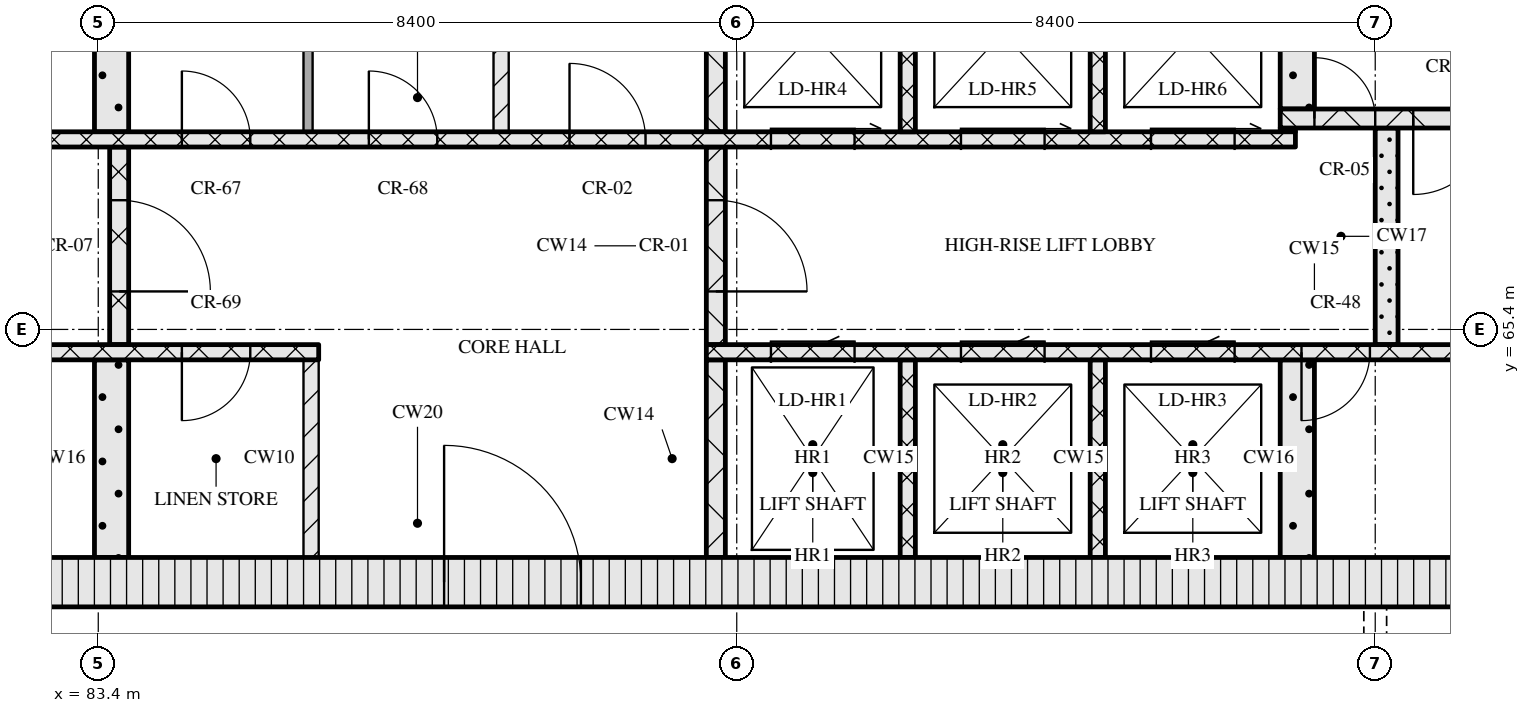
"""IFC4 building model, lengths in metres.
Left out: names, types, materials, properties, quantities, classifications, styles, units other than length and angle.
Written with IfcOpenShell. Run it as: python <this file> out.ifc"""

import sys

from ifc_helpers import new_model, si_unit, direction, frame, frame_2d, origin, place, context, subcontext, project, spatial, rectangle, extrude, element, fill, save


model = new_model("IFC4")
c1 = context("Model", 3, precision=1e-05, world=origin(), true_north=direction((0.0, 1.0)))
c2 = subcontext(c1, "Body", "Model", "MODEL_VIEW")
j1 = project(units=[si_unit("LENGTHUNIT", "METRE"), si_unit("PLANEANGLEUNIT", "RADIAN")], contexts=[c1])
p1 = place(None, origin())
s1 = spatial("IfcSite", under=j1, at=p1, CompositionType="ELEMENT")
p2 = place(p1, origin())
s2 = spatial("IfcBuilding", under=s1, at=p2, CompositionType="ELEMENT")
p3 = place(p2, frame((0.0, 0.0, 241.5)))
s3 = spatial("IfcBuildingStorey", under=s2, at=p3, CompositionType="ELEMENT", Elevation=241.5)
p4 = place(p3, frame((67.15, 62.075, 0.0), z_axis=(0.0, 0.0, 1.0), x_axis=(1.0, 0.0, 0.0)))
e1 = element("IfcWall", 1, at=p4, inside=s3, PredefinedType="SOLIDWALL", context=c2, shape_type="SweptSolid", body=[
    extrude(rectangle(XDim=40.9, YDim=0.65, at=frame_2d((20.45, 0.0))), origin(), (0.0, 0.0, 1.0), 3.32),
])
p5 = place(p4, frame((20.8, 0.0, 0.0)))
e2 = element("IfcOpeningElement", 2, at=p5, cuts=e1, PredefinedType="OPENING", context=c2, shape_type="SweptSolid", body=[
    extrude(rectangle(XDim=1.8, YDim=2.1, at=frame_2d((0.9, 1.05))), frame((0.0, 0.335, 0.0), z_axis=(0.0, -1.0, 0.0), x_axis=(1.0, 0.0, 0.0)), (0.0, 0.0, 1.0), 0.67),
])
p6 = place(p3, frame((83.575, 62.4, 0.0), z_axis=(0.0, 0.0, 1.0), x_axis=(0.0, 1.0, 0.0)))
e3 = element("IfcWall", 3, at=p6, inside=s3, PredefinedType="SOLIDWALL", context=c2, shape_type="SweptSolid", body=[
    extrude(rectangle(XDim=2.6, YDim=0.45, at=frame_2d((1.3, 0.0))), origin(), (0.0, 0.0, 1.0), 3.32),
])
p7 = place(p3, frame((86.2, 62.4, 0.0), z_axis=(0.0, 0.0, 1.0), x_axis=(0.0, 1.0, 0.0)))
e4 = element("IfcWall", 4, at=p7, inside=s3, PredefinedType="PARTITIONING", context=c2, shape_type="SweptSolid", body=[
    extrude(rectangle(XDim=2.6, YDim=0.2, at=frame_2d((1.3, 0.0))), origin(), (0.0, 0.0, 1.0), 3.32),
])
p8 = place(p3, frame((91.525, 62.4, 0.0), z_axis=(0.0, 0.0, 1.0), x_axis=(0.0, 1.0, 0.0)))
e5 = element("IfcWall", 5, at=p8, inside=s3, PredefinedType="SOLIDWALL", context=c2, shape_type="SweptSolid", body=[
    extrude(rectangle(XDim=2.6, YDim=0.25, at=frame_2d((1.3, 0.0))), origin(), (0.0, 0.0, 1.0), 3.32),
])
for number, where, z_axis, x_axis in (
    (6, (94.05, 62.4, 0.0), (0.0, 0.0, 1.0), (0.0, 1.0, 0.0)),
    (7, (96.55, 62.4, 0.0), (0.0, 0.0, 1.0), (0.0, 1.0, 0.0)),
):
    element("IfcWall", number, at=place(p3, frame(where, z_axis=z_axis, x_axis=x_axis)), inside=s3, PredefinedType="SOLIDWALL", context=c2, shape_type="SweptSolid", body=[
        extrude(rectangle(XDim=2.6, YDim=0.2, at=frame_2d((1.3, 0.0))), origin(), (0.0, 0.0, 1.0), 3.32),
    ])
p9 = place(p3, frame((99.175, 62.4, 0.0), z_axis=(0.0, 0.0, 1.0), x_axis=(0.0, 1.0, 0.0)))
e8 = element("IfcWall", 8, at=p9, inside=s3, PredefinedType="SOLIDWALL", context=c2, shape_type="SweptSolid", body=[
    extrude(rectangle(XDim=2.6, YDim=0.45, at=frame_2d((1.3, 0.0))), origin(), (0.0, 0.0, 1.0), 3.32),
])
p10 = place(p3, frame((67.8, 65.1, 0.0), z_axis=(0.0, 0.0, 1.0), x_axis=(1.0, 0.0, 0.0)))
e9 = element("IfcWall", 9, at=p10, inside=s3, PredefinedType="SOLIDWALL", context=c2, shape_type="SweptSolid", body=[
    extrude(rectangle(XDim=18.5, YDim=0.2, at=frame_2d((9.25, 0.0))), origin(), (0.0, 0.0, 1.0), 3.32),
])
p11 = place(p10, frame((7.27, 0.0, 0.0)))
e10 = element("IfcOpeningElement", 10, at=p11, cuts=e9, PredefinedType="OPENING", context=c2, shape_type="SweptSolid", body=[
    extrude(rectangle(XDim=0.9, YDim=2.1, at=frame_2d((0.45, 1.05))), frame((0.0, 0.11, 0.0), z_axis=(0.0, -1.0, 0.0), x_axis=(1.0, 0.0, 0.0)), (0.0, 0.0, 1.0), 0.22),
])
p12 = place(p10, frame((9.65, 0.0, 0.0)))
e11 = element("IfcOpeningElement", 11, at=p12, cuts=e9, PredefinedType="OPENING", context=c2, shape_type="SweptSolid", body=[
    extrude(rectangle(XDim=0.9, YDim=2.1, at=frame_2d((0.45, 1.05))), frame((0.0, 0.11, 0.0), z_axis=(0.0, -1.0, 0.0), x_axis=(1.0, 0.0, 0.0)), (0.0, 0.0, 1.0), 0.22),
])
p13 = place(p10, frame((13.36, 0.0, 0.0)))
e12 = element("IfcOpeningElement", 12, at=p13, cuts=e9, PredefinedType="OPENING", context=c2, shape_type="SweptSolid", body=[
    extrude(rectangle(XDim=0.9, YDim=2.1, at=frame_2d((0.45, 1.05))), frame((0.0, 0.11, 0.0), z_axis=(0.0, -1.0, 0.0), x_axis=(1.0, 0.0, 0.0)), (0.0, 0.0, 1.0), 0.22),
])
p14 = place(p10, frame((16.7, 0.0, 0.0)))
e13 = element("IfcOpeningElement", 13, at=p14, cuts=e9, PredefinedType="OPENING", context=c2, shape_type="SweptSolid", body=[
    extrude(rectangle(XDim=0.9, YDim=2.1, at=frame_2d((0.45, 1.05))), frame((0.0, 0.11, 0.0), z_axis=(0.0, -1.0, 0.0), x_axis=(1.0, 0.0, 0.0)), (0.0, 0.0, 1.0), 0.22),
])
p15 = place(p3, frame((91.4, 65.1, 0.0), z_axis=(0.0, 0.0, 1.0), x_axis=(1.0, 0.0, 0.0)))
e14 = element("IfcWall", 14, at=p15, inside=s3, PredefinedType="SOLIDWALL", context=c2, shape_type="SweptSolid", body=[
    extrude(rectangle(XDim=16.0, YDim=0.2, at=frame_2d((8.0, 0.0))), origin(), (0.0, 0.0, 1.0), 3.32),
])
p16 = place(p15, frame((0.85, 0.0, 0.0)))
e15 = element("IfcOpeningElement", 15, at=p16, cuts=e14, PredefinedType="OPENING", context=c2, shape_type="SweptSolid", body=[
    extrude(rectangle(XDim=1.1, YDim=2.1, at=frame_2d((0.55, 1.05))), frame((0.0, 0.11, 0.0), z_axis=(0.0, -1.0, 0.0), x_axis=(1.0, 0.0, 0.0)), (0.0, 0.0, 1.0), 0.22),
])
p17 = place(p15, frame((3.35, 0.0, 0.0)))
e16 = element("IfcOpeningElement", 16, at=p17, cuts=e14, PredefinedType="OPENING", context=c2, shape_type="SweptSolid", body=[
    extrude(rectangle(XDim=1.1, YDim=2.1, at=frame_2d((0.55, 1.05))), frame((0.0, 0.11, 0.0), z_axis=(0.0, -1.0, 0.0), x_axis=(1.0, 0.0, 0.0)), (0.0, 0.0, 1.0), 0.22),
])
p18 = place(p15, frame((5.85, 0.0, 0.0)))
e17 = element("IfcOpeningElement", 17, at=p18, cuts=e14, PredefinedType="OPENING", context=c2, shape_type="SweptSolid", body=[
    extrude(rectangle(XDim=1.1, YDim=2.1, at=frame_2d((0.55, 1.05))), frame((0.0, 0.11, 0.0), z_axis=(0.0, -1.0, 0.0), x_axis=(1.0, 0.0, 0.0)), (0.0, 0.0, 1.0), 0.22),
])
p19 = place(p15, frame((7.83, 0.0, 0.0)))
e18 = element("IfcOpeningElement", 18, at=p19, cuts=e14, PredefinedType="OPENING", context=c2, shape_type="SweptSolid", body=[
    extrude(rectangle(XDim=0.9, YDim=2.1, at=frame_2d((0.45, 1.05))), frame((0.0, 0.11, 0.0), z_axis=(0.0, -1.0, 0.0), x_axis=(1.0, 0.0, 0.0)), (0.0, 0.0, 1.0), 0.22),
])
p20 = place(p3, frame((83.675, 65.2, 0.0), z_axis=(0.0, 0.0, 1.0), x_axis=(0.0, 1.0, 0.0)))
e19 = element("IfcWall", 19, at=p20, inside=s3, PredefinedType="SOLIDWALL", context=c2, shape_type="SweptSolid", body=[
    extrude(rectangle(XDim=2.6, YDim=0.25, at=frame_2d((1.3, 0.0))), origin(), (0.0, 0.0, 1.0), 3.32),
])
p21 = place(p20, frame((0.7, 0.0, 0.0)))
e20 = element("IfcOpeningElement", 20, at=p21, cuts=e19, PredefinedType="OPENING", context=c2, shape_type="SweptSolid", body=[
    extrude(rectangle(XDim=1.2, YDim=2.1, at=frame_2d((0.6, 1.05))), frame((0.0, 0.135, 0.0), z_axis=(0.0, -1.0, 0.0), x_axis=(1.0, 0.0, 0.0)), (0.0, 0.0, 1.0), 0.27),
])
p22 = place(p3, frame((91.525, 65.2, 0.0), z_axis=(0.0, 0.0, 1.0), x_axis=(0.0, 1.0, 0.0)))
e21 = element("IfcWall", 21, at=p22, inside=s3, PredefinedType="SOLIDWALL", context=c2, shape_type="SweptSolid", body=[
    extrude(rectangle(XDim=2.6, YDim=0.25, at=frame_2d((1.3, 0.0))), origin(), (0.0, 0.0, 1.0), 3.32),
])
p23 = place(p22, frame((0.7, 0.0, 0.0)))
e22 = element("IfcOpeningElement", 22, at=p23, cuts=e21, PredefinedType="OPENING", context=c2, shape_type="SweptSolid", body=[
    extrude(rectangle(XDim=1.2, YDim=2.1, at=frame_2d((0.6, 1.05))), frame((0.0, 0.135, 0.0), z_axis=(0.0, -1.0, 0.0), x_axis=(1.0, 0.0, 0.0)), (0.0, 0.0, 1.0), 0.27),
])
p24 = place(p3, frame((100.35, 65.2, 0.0), z_axis=(0.0, 0.0, 1.0), x_axis=(0.0, 1.0, 0.0)))
e23 = element("IfcWall", 23, at=p24, inside=s3, PredefinedType="SOLIDWALL", context=c2, shape_type="SweptSolid", body=[
    extrude(rectangle(XDim=2.85, YDim=0.3, at=frame_2d((1.425, 0.0))), origin(), (0.0, 0.0, 1.0), 3.32),
])
p25 = place(p3, frame((76.05, 67.9, 0.0), z_axis=(0.0, 0.0, 1.0), x_axis=(1.0, 0.0, 0.0)))
e24 = element("IfcWall", 24, at=p25, inside=s3, PredefinedType="SOLIDWALL", context=c2, shape_type="SweptSolid", body=[
    extrude(rectangle(XDim=23.1, YDim=0.2, at=frame_2d((11.55, 0.0))), origin(), (0.0, 0.0, 1.0), 3.32),
])
p26 = place(p25, frame((0.75, 0.0, 0.0)))
e25 = element("IfcOpeningElement", 25, at=p26, cuts=e24, PredefinedType="OPENING", context=c2, shape_type="SweptSolid", body=[
    extrude(rectangle(XDim=0.9, YDim=2.1, at=frame_2d((0.45, 1.05))), frame((0.0, 0.11, 0.0), z_axis=(0.0, -1.0, 0.0), x_axis=(1.0, 0.0, 0.0)), (0.0, 0.0, 1.0), 0.22),
])
p27 = place(p25, frame((3.32, 0.0, 0.0)))
e26 = element("IfcOpeningElement", 26, at=p27, cuts=e24, PredefinedType="OPENING", context=c2, shape_type="SweptSolid", body=[
    extrude(rectangle(XDim=0.9, YDim=2.1, at=frame_2d((0.45, 1.05))), frame((0.0, 0.11, 0.0), z_axis=(0.0, -1.0, 0.0), x_axis=(1.0, 0.0, 0.0)), (0.0, 0.0, 1.0), 0.22),
])
p28 = place(p25, frame((5.77, 0.0, 0.0)))
e27 = element("IfcOpeningElement", 27, at=p28, cuts=e24, PredefinedType="OPENING", context=c2, shape_type="SweptSolid", body=[
    extrude(rectangle(XDim=0.9, YDim=2.1, at=frame_2d((0.45, 1.05))), frame((0.0, 0.11, 0.0), z_axis=(0.0, -1.0, 0.0), x_axis=(1.0, 0.0, 0.0)), (0.0, 0.0, 1.0), 0.22),
])
p29 = place(p25, frame((8.45, 0.0, 0.0)))
e28 = element("IfcOpeningElement", 28, at=p29, cuts=e24, PredefinedType="OPENING", context=c2, shape_type="SweptSolid", body=[
    extrude(rectangle(XDim=0.9, YDim=2.1, at=frame_2d((0.45, 1.05))), frame((0.0, 0.11, 0.0), z_axis=(0.0, -1.0, 0.0), x_axis=(1.0, 0.0, 0.0)), (0.0, 0.0, 1.0), 0.22),
])
p30 = place(p25, frame((10.91, 0.0, 0.0)))
e29 = element("IfcOpeningElement", 29, at=p30, cuts=e24, PredefinedType="OPENING", context=c2, shape_type="SweptSolid", body=[
    extrude(rectangle(XDim=0.9, YDim=2.1, at=frame_2d((0.45, 1.05))), frame((0.0, 0.11, 0.0), z_axis=(0.0, -1.0, 0.0), x_axis=(1.0, 0.0, 0.0)), (0.0, 0.0, 1.0), 0.22),
])
p31 = place(p25, frame((13.55, 0.0, 0.0)))
e30 = element("IfcOpeningElement", 30, at=p31, cuts=e24, PredefinedType="OPENING", context=c2, shape_type="SweptSolid", body=[
    extrude(rectangle(XDim=1.0, YDim=2.1, at=frame_2d((0.5, 1.05))), frame((0.0, 0.11, 0.0), z_axis=(0.0, -1.0, 0.0), x_axis=(1.0, 0.0, 0.0)), (0.0, 0.0, 1.0), 0.22),
])
p32 = place(p25, frame((16.2, 0.0, 0.0)))
e31 = element("IfcOpeningElement", 31, at=p32, cuts=e24, PredefinedType="OPENING", context=c2, shape_type="SweptSolid", body=[
    extrude(rectangle(XDim=1.1, YDim=2.1, at=frame_2d((0.55, 1.05))), frame((0.0, 0.11, 0.0), z_axis=(0.0, -1.0, 0.0), x_axis=(1.0, 0.0, 0.0)), (0.0, 0.0, 1.0), 0.22),
])
p33 = place(p25, frame((18.7, 0.0, 0.0)))
e32 = element("IfcOpeningElement", 32, at=p33, cuts=e24, PredefinedType="OPENING", context=c2, shape_type="SweptSolid", body=[
    extrude(rectangle(XDim=1.1, YDim=2.1, at=frame_2d((0.55, 1.05))), frame((0.0, 0.11, 0.0), z_axis=(0.0, -1.0, 0.0), x_axis=(1.0, 0.0, 0.0)), (0.0, 0.0, 1.0), 0.22),
])
p34 = place(p25, frame((21.2, 0.0, 0.0)))
e33 = element("IfcOpeningElement", 33, at=p34, cuts=e24, PredefinedType="OPENING", context=c2, shape_type="SweptSolid", body=[
    extrude(rectangle(XDim=1.1, YDim=2.1, at=frame_2d((0.55, 1.05))), frame((0.0, 0.11, 0.0), z_axis=(0.0, -1.0, 0.0), x_axis=(1.0, 0.0, 0.0)), (0.0, 0.0, 1.0), 0.22),
])
p35 = place(p3, frame((83.575, 68.0, 0.0), z_axis=(0.0, 0.0, 1.0), x_axis=(0.0, 1.0, 0.0)))
e34 = element("IfcWall", 34, at=p35, inside=s3, PredefinedType="SOLIDWALL", context=c2, shape_type="SweptSolid", body=[
    extrude(rectangle(XDim=2.6, YDim=0.45, at=frame_2d((1.3, 0.0))), origin(), (0.0, 0.0, 1.0), 3.32),
])
p36 = place(p3, frame((86.16, 68.0, 0.0), z_axis=(0.0, 0.0, 1.0), x_axis=(0.0, 1.0, 0.0)))
e35 = element("IfcWall", 35, at=p36, inside=s3, PredefinedType="PARTITIONING", context=c2, shape_type="SweptSolid", body=[
    extrude(rectangle(XDim=2.6, YDim=0.12, at=frame_2d((1.3, 0.0))), origin(), (0.0, 0.0, 1.0), 3.32),
])
p37 = place(p3, frame((88.7, 68.0, 0.0), z_axis=(0.0, 0.0, 1.0), x_axis=(0.0, 1.0, 0.0)))
e36 = element("IfcWall", 36, at=p37, inside=s3, PredefinedType="PARTITIONING", context=c2, shape_type="SweptSolid", body=[
    extrude(rectangle(XDim=2.6, YDim=0.2, at=frame_2d((1.3, 0.0))), origin(), (0.0, 0.0, 1.0), 3.32),
])
p38 = place(p3, frame((91.525, 68.0, 0.0), z_axis=(0.0, 0.0, 1.0), x_axis=(0.0, 1.0, 0.0)))
e37 = element("IfcWall", 37, at=p38, inside=s3, PredefinedType="SOLIDWALL", context=c2, shape_type="SweptSolid", body=[
    extrude(rectangle(XDim=2.6, YDim=0.25, at=frame_2d((1.3, 0.0))), origin(), (0.0, 0.0, 1.0), 3.32),
])
for number, where, z_axis, x_axis in (
    (38, (94.05, 68.0, 0.0), (0.0, 0.0, 1.0), (0.0, 1.0, 0.0)),
    (39, (96.55, 68.0, 0.0), (0.0, 0.0, 1.0), (0.0, 1.0, 0.0)),
):
    element("IfcWall", number, at=place(p3, frame(where, z_axis=z_axis, x_axis=x_axis)), inside=s3, PredefinedType="SOLIDWALL", context=c2, shape_type="SweptSolid", body=[
        extrude(rectangle(XDim=2.6, YDim=0.2, at=frame_2d((1.3, 0.0))), origin(), (0.0, 0.0, 1.0), 3.32),
    ])
p39 = place(p3, frame((98.95, 68.025, 0.0), z_axis=(0.0, 0.0, 1.0), x_axis=(1.0, 0.0, 0.0)))
e40 = element("IfcWall", 40, at=p39, inside=s3, PredefinedType="SOLIDWALL", context=c2, shape_type="SweptSolid", body=[
    extrude(rectangle(XDim=0.2, YDim=0.05, at=frame_2d((0.1, 0.0))), origin(), (0.0, 0.0, 1.0), 3.32),
])
p40 = place(p3, frame((98.95, 68.175, 0.0), z_axis=(0.0, 0.0, 1.0), x_axis=(1.0, 0.0, 0.0)))
e41 = element("IfcWall", 41, at=p40, inside=s3, PredefinedType="SOLIDWALL", context=c2, shape_type="SweptSolid", body=[
    extrude(rectangle(XDim=8.45, YDim=0.25, at=frame_2d((4.225, 0.0))), origin(), (0.0, 0.0, 1.0), 3.32),
])
p41 = place(p40, frame((0.45, 0.0, 0.0)))
e42 = element("IfcOpeningElement", 42, at=p41, cuts=e41, PredefinedType="OPENING", context=c2, shape_type="SweptSolid", body=[
    extrude(rectangle(XDim=0.8, YDim=2.1, at=frame_2d((0.4, 1.05))), frame((0.0, 0.135, 0.0), z_axis=(0.0, -1.0, 0.0), x_axis=(1.0, 0.0, 0.0)), (0.0, 0.0, 1.0), 0.27),
])
p42 = place(p40, frame((1.75, 0.0, 0.0)))
e43 = element("IfcOpeningElement", 43, at=p42, cuts=e41, PredefinedType="OPENING", context=c2, shape_type="SweptSolid", body=[
    extrude(rectangle(XDim=1.0, YDim=2.1, at=frame_2d((0.5, 1.05))), frame((0.0, 0.135, 0.0), z_axis=(0.0, -1.0, 0.0), x_axis=(1.0, 0.0, 0.0)), (0.0, 0.0, 1.0), 0.27),
])
p43 = place(p3, frame((99.175, 68.3, 0.0), z_axis=(0.0, 0.0, 1.0), x_axis=(0.0, 1.0, 0.0)))
e44 = element("IfcWall", 44, at=p43, inside=s3, PredefinedType="SOLIDWALL", context=c2, shape_type="SweptSolid", body=[
    extrude(rectangle(XDim=2.3, YDim=0.45, at=frame_2d((1.15, 0.0))), origin(), (0.0, 0.0, 1.0), 3.32),
])
p44 = place(p5, origin())
e45 = element("IfcDoor", 45, at=p44, inside=s3, OperationType="DOUBLE_DOOR_SINGLE_SWING", PredefinedType="DOOR", context=c2, shape_type="SweptSolid", body=[
    extrude(rectangle(XDim=1.8, YDim=2.1, at=frame_2d((0.9, 1.05))), frame((0.0, 0.025, 0.0), z_axis=(0.0, -1.0, 0.0), x_axis=(1.0, 0.0, 0.0)), (0.0, 0.0, 1.0), 0.05),
])
fill(e2, e45)
p45 = place(p14, origin())
e46 = element("IfcDoor", 46, at=p45, inside=s3, OperationType="SINGLE_SWING_RIGHT", PredefinedType="DOOR", context=c2, shape_type="SweptSolid", body=[
    extrude(rectangle(XDim=0.9, YDim=2.1, at=frame_2d((0.45, 1.05))), frame((0.0, 0.025, 0.0), z_axis=(0.0, -1.0, 0.0), x_axis=(1.0, 0.0, 0.0)), (0.0, 0.0, 1.0), 0.05),
])
fill(e13, e46)
p46 = place(p16, origin())
e47 = element("IfcDoor", 47, at=p46, inside=s3, OperationType="SLIDING_TO_LEFT", PredefinedType="DOOR", context=c2, shape_type="SweptSolid", body=[
    extrude(rectangle(XDim=1.1, YDim=2.1, at=frame_2d((0.55, 1.05))), frame((0.0, 0.025, 0.0), z_axis=(0.0, -1.0, 0.0), x_axis=(1.0, 0.0, 0.0)), (0.0, 0.0, 1.0), 0.05),
])
fill(e15, e47)
p47 = place(p17, origin())
e48 = element("IfcDoor", 48, at=p47, inside=s3, OperationType="SLIDING_TO_LEFT", PredefinedType="DOOR", context=c2, shape_type="SweptSolid", body=[
    extrude(rectangle(XDim=1.1, YDim=2.1, at=frame_2d((0.55, 1.05))), frame((0.0, 0.025, 0.0), z_axis=(0.0, -1.0, 0.0), x_axis=(1.0, 0.0, 0.0)), (0.0, 0.0, 1.0), 0.05),
])
fill(e16, e48)
p48 = place(p18, origin())
e49 = element("IfcDoor", 49, at=p48, inside=s3, OperationType="SLIDING_TO_LEFT", PredefinedType="DOOR", context=c2, shape_type="SweptSolid", body=[
    extrude(rectangle(XDim=1.1, YDim=2.1, at=frame_2d((0.55, 1.05))), frame((0.0, 0.025, 0.0), z_axis=(0.0, -1.0, 0.0), x_axis=(1.0, 0.0, 0.0)), (0.0, 0.0, 1.0), 0.05),
])
fill(e17, e49)
p49 = place(p19, origin())
e50 = element("IfcDoor", 50, at=p49, inside=s3, OperationType="SINGLE_SWING_RIGHT", PredefinedType="DOOR", context=c2, shape_type="SweptSolid", body=[
    extrude(rectangle(XDim=0.9, YDim=2.1, at=frame_2d((0.45, 1.05))), frame((0.0, 0.025, 0.0), z_axis=(0.0, -1.0, 0.0), x_axis=(1.0, 0.0, 0.0)), (0.0, 0.0, 1.0), 0.05),
])
fill(e18, e50)
p50 = place(p21, origin())
e51 = element("IfcDoor", 51, at=p50, inside=s3, OperationType="SINGLE_SWING_RIGHT", PredefinedType="DOOR", context=c2, shape_type="SweptSolid", body=[
    extrude(rectangle(XDim=1.2, YDim=2.1, at=frame_2d((0.6, 1.05))), frame((0.0, 0.025, 0.0), z_axis=(0.0, -1.0, 0.0), x_axis=(1.0, 0.0, 0.0)), (0.0, 0.0, 1.0), 0.05),
])
fill(e20, e51)
p51 = place(p23, origin())
e52 = element("IfcDoor", 52, at=p51, inside=s3, OperationType="SINGLE_SWING_RIGHT", PredefinedType="DOOR", context=c2, shape_type="SweptSolid", body=[
    extrude(rectangle(XDim=1.2, YDim=2.1, at=frame_2d((0.6, 1.05))), frame((0.0, 0.025, 0.0), z_axis=(0.0, -1.0, 0.0), x_axis=(1.0, 0.0, 0.0)), (0.0, 0.0, 1.0), 0.05),
])
fill(e22, e52)
p52 = place(p29, origin())
e53 = element("IfcDoor", 53, at=p52, inside=s3, OperationType="SINGLE_SWING_LEFT", PredefinedType="DOOR", context=c2, shape_type="SweptSolid", body=[
    extrude(rectangle(XDim=0.9, YDim=2.1, at=frame_2d((0.45, 1.05))), frame((0.0, 0.025, 0.0), z_axis=(0.0, -1.0, 0.0), x_axis=(1.0, 0.0, 0.0)), (0.0, 0.0, 1.0), 0.05),
])
fill(e28, e53)
p53 = place(p30, origin())
e54 = element("IfcDoor", 54, at=p53, inside=s3, OperationType="SINGLE_SWING_LEFT", PredefinedType="DOOR", context=c2, shape_type="SweptSolid", body=[
    extrude(rectangle(XDim=0.9, YDim=2.1, at=frame_2d((0.45, 1.05))), frame((0.0, 0.025, 0.0), z_axis=(0.0, -1.0, 0.0), x_axis=(1.0, 0.0, 0.0)), (0.0, 0.0, 1.0), 0.05),
])
fill(e29, e54)
p54 = place(p31, origin())
e55 = element("IfcDoor", 55, at=p54, inside=s3, OperationType="SINGLE_SWING_LEFT", PredefinedType="DOOR", context=c2, shape_type="SweptSolid", body=[
    extrude(rectangle(XDim=1.0, YDim=2.1, at=frame_2d((0.5, 1.05))), frame((0.0, 0.025, 0.0), z_axis=(0.0, -1.0, 0.0), x_axis=(1.0, 0.0, 0.0)), (0.0, 0.0, 1.0), 0.05),
])
fill(e30, e55)
p55 = place(p32, origin())
e56 = element("IfcDoor", 56, at=p55, inside=s3, OperationType="SLIDING_TO_RIGHT", PredefinedType="DOOR", context=c2, shape_type="SweptSolid", body=[
    extrude(rectangle(XDim=1.1, YDim=2.1, at=frame_2d((0.55, 1.05))), frame((0.0, 0.025, 0.0), z_axis=(0.0, -1.0, 0.0), x_axis=(1.0, 0.0, 0.0)), (0.0, 0.0, 1.0), 0.05),
])
fill(e31, e56)
p56 = place(p33, origin())
e57 = element("IfcDoor", 57, at=p56, inside=s3, OperationType="SLIDING_TO_RIGHT", PredefinedType="DOOR", context=c2, shape_type="SweptSolid", body=[
    extrude(rectangle(XDim=1.1, YDim=2.1, at=frame_2d((0.55, 1.05))), frame((0.0, 0.025, 0.0), z_axis=(0.0, -1.0, 0.0), x_axis=(1.0, 0.0, 0.0)), (0.0, 0.0, 1.0), 0.05),
])
fill(e32, e57)
p57 = place(p34, origin())
e58 = element("IfcDoor", 58, at=p57, inside=s3, OperationType="SLIDING_TO_RIGHT", PredefinedType="DOOR", context=c2, shape_type="SweptSolid", body=[
    extrude(rectangle(XDim=1.1, YDim=2.1, at=frame_2d((0.55, 1.05))), frame((0.0, 0.025, 0.0), z_axis=(0.0, -1.0, 0.0), x_axis=(1.0, 0.0, 0.0)), (0.0, 0.0, 1.0), 0.05),
])
fill(e33, e58)
p58 = place(p41, origin())
e59 = element("IfcDoor", 59, at=p58, inside=s3, OperationType="SINGLE_SWING_LEFT", PredefinedType="DOOR", context=c2, shape_type="SweptSolid", body=[
    extrude(rectangle(XDim=0.8, YDim=2.1, at=frame_2d((0.4, 1.05))), frame((0.0, 0.025, 0.0), z_axis=(0.0, -1.0, 0.0), x_axis=(1.0, 0.0, 0.0)), (0.0, 0.0, 1.0), 0.05),
])
fill(e42, e59)
p59 = place(p42, origin())
e60 = element("IfcDoor", 60, at=p59, inside=s3, OperationType="SINGLE_SWING_RIGHT", PredefinedType="DOOR", context=c2, shape_type="SweptSolid", body=[
    extrude(rectangle(XDim=1.0, YDim=2.1, at=frame_2d((0.5, 1.05))), frame((0.0, 0.025, 0.0), z_axis=(0.0, -1.0, 0.0), x_axis=(1.0, 0.0, 0.0)), (0.0, 0.0, 1.0), 0.05),
])
fill(e43, e60)
save(model, sys.argv[1])
